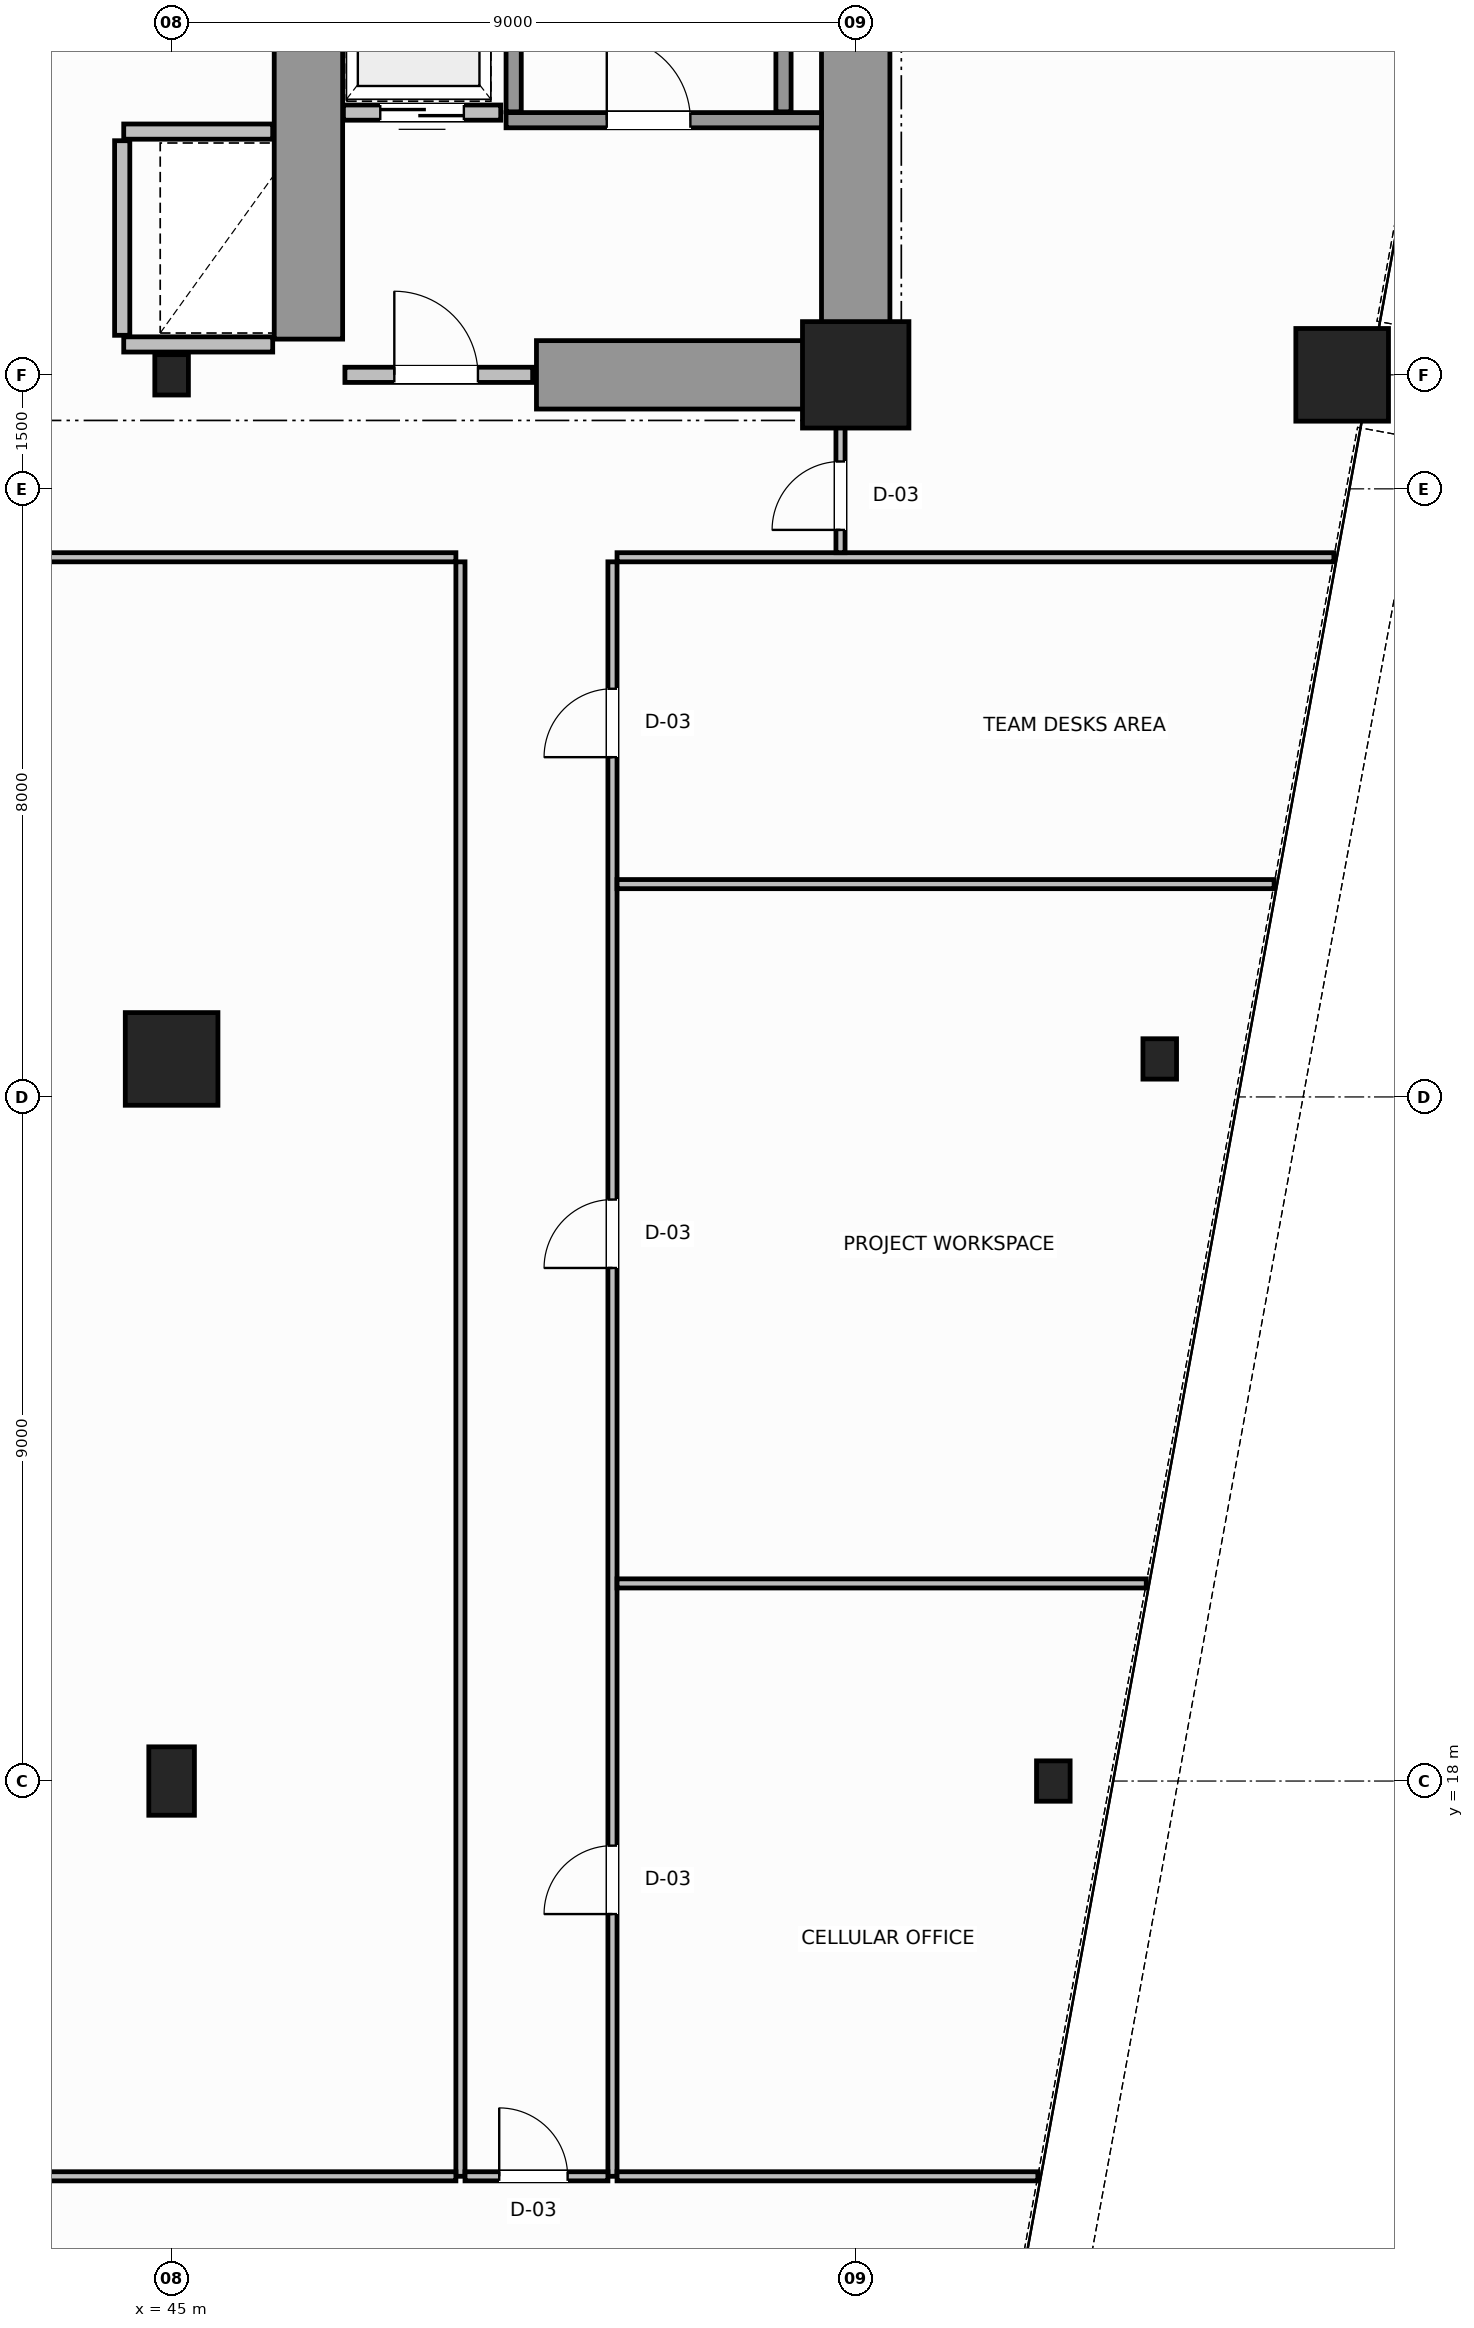
"""IFC4 building model, lengths in metres.
Left out: names, types, materials, properties, quantities, classifications, styles, units other than length and angle.
Written with IfcOpenShell. Run it as: python <this file> out.ifc"""

import sys

from ifc_helpers import new_model, si_unit, direction, frame, frame_2d, origin, origin_2d, place, context, subcontext, project, spatial, rectangle, hollow_rectangle, hollow_circle, i_section, extrude, source, transform, mapped, element, fill, save


model = new_model("IFC4")
c1 = context("Model", 3, precision=1e-05, world=origin(), true_north=direction((0.0, 1.0)))
c2 = subcontext(c1, "Body", "Model", "MODEL_VIEW")
j1 = project(units=[si_unit("LENGTHUNIT", "METRE"), si_unit("PLANEANGLEUNIT", "RADIAN")], contexts=[c1])
p1 = place(None, origin())
s1 = spatial("IfcSite", under=j1, at=p1, CompositionType="ELEMENT")
p2 = place(p1, origin())
s2 = spatial("IfcBuilding", under=s1, at=p2, CompositionType="ELEMENT")
p3 = place(p2, frame((0.0, 0.0, 79.6)))
s3 = spatial("IfcBuildingStorey", under=s2, at=p3, CompositionType="ELEMENT", Elevation=79.6)
m1 = source(origin(), c2, "Body", "SweptSolid", [
    extrude(i_section(OverallWidth=0.442, OverallDepth=0.531, WebThickness=0.065, FlangeThickness=0.076, FilletRadius=0.015, at=origin_2d()), origin(), (0.0, 0.0, 1.0), 3.8),
])
p4 = place(p3, frame((45.0, 36.5, 0.0), z_axis=(0.0, 0.0, 1.0), x_axis=(1.0, 0.0, 0.0)))
e1 = element("IfcColumn", 1, at=p4, inside=s3, PredefinedType="COLUMN", context=c2, shape_type="MappedRepresentation", body=[
    mapped(m1, transform((0.0, 0.0, 0.0), scale=1.0)),
])
m2 = source(origin(), c2, "Body", "SweptSolid", [
    extrude(rectangle(XDim=1.4, YDim=1.4, at=origin_2d()), origin(), (0.0, 0.0, 1.0), 3.8),
])
p5 = place(p3, frame((54.0, 36.5, 0.0), z_axis=(0.0, 0.0, 1.0), x_axis=(1.0, 0.0, 0.0)))
e2 = element("IfcColumn", 2, at=p5, inside=s3, PredefinedType="COLUMN", context=c2, shape_type="MappedRepresentation", body=[
    mapped(m2, transform((0.0, 0.0, 0.0), scale=1.0)),
])
m3 = source(origin(), c2, "Body", "SweptSolid", [
    extrude(hollow_circle(Radius=0.61, WallThickness=0.05, at=origin_2d()), origin(), (0.0, 0.0, 1.0), 3.8),
])
p6 = place(p3, frame((60.4, 36.5, 0.0), z_axis=(0.0, 0.0, 1.0), x_axis=(1.0, 0.0, 0.0)))
e3 = element("IfcColumn", 3, at=p6, inside=s3, PredefinedType="COLUMN", context=c2, shape_type="MappedRepresentation", body=[
    mapped(m3, transform((0.0, 0.0, 0.0), scale=1.0)),
])
m4 = source(origin(), c2, "Body", "SweptSolid", [
    extrude(i_section(OverallWidth=0.442, OverallDepth=0.531, WebThickness=0.065, FlangeThickness=0.076, FilletRadius=0.015, at=origin_2d()), origin(), (0.0, 0.0, 1.0), 3.8),
])
for number, where, z_axis, x_axis in (
    (4, (58.0, 27.5, 0.0), (0.0, 0.0, 1.0), (1.0, 0.0, 0.0)),
    (5, (56.6, 18.0, 0.0), (0.0, 0.0, 1.0), (1.0, 0.0, 0.0)),
):
    element("IfcColumn", number, at=place(p3, frame(where, z_axis=z_axis, x_axis=x_axis)), inside=s3, PredefinedType="COLUMN", context=c2, shape_type="MappedRepresentation", body=[
        mapped(m4, transform((0.0, 0.0, 0.0), scale=1.0)),
    ])
p7 = place(p3, frame((45.0, 27.5, 0.0), z_axis=(0.0, 0.0, 1.0), x_axis=(1.0, 0.0, 0.0)))
e6 = element("IfcColumn", 6, at=p7, inside=s3, PredefinedType="COLUMN", context=c2, shape_type="MappedRepresentation", body=[
    mapped(m3, transform((0.0, 0.0, 0.0), scale=1.0)),
])
m5 = source(origin(), c2, "Body", "SweptSolid", [
    extrude(hollow_rectangle(XDim=0.6, YDim=0.9, WallThickness=0.04, InnerFilletRadius=0.04, OuterFilletRadius=0.08, at=origin_2d()), origin(), (0.0, 0.0, 1.0), 3.8),
])
p8 = place(p3, frame((45.0, 18.0, 0.0), z_axis=(0.0, 0.0, 1.0), x_axis=(1.0, 0.0, 0.0)))
e7 = element("IfcColumn", 7, at=p8, inside=s3, PredefinedType="COLUMN", context=c2, shape_type="MappedRepresentation", body=[
    mapped(m5, transform((0.0, 0.0, 0.0), scale=1.0)),
])
p9 = place(p3, frame((54.0, 36.5, 0.0), z_axis=(0.0, 0.0, 1.0), x_axis=(0.0, 1.0, 0.0)))
e8 = element("IfcWall", 8, at=p9, inside=s3, PredefinedType="SHEAR", context=c2, shape_type="SweptSolid", body=[
    extrude(rectangle(XDim=14.5, YDim=0.9, at=frame_2d((7.25, 0.0))), origin(), (0.0, 0.0, 1.0), 3.8),
])
p10 = place(p3, frame((49.8, 36.5, 0.0), z_axis=(0.0, 0.0, 1.0), x_axis=(1.0, 0.0, 0.0)))
e9 = element("IfcWall", 9, at=p10, inside=s3, PredefinedType="SHEAR", context=c2, shape_type="SweptSolid", body=[
    extrude(rectangle(XDim=3.73, YDim=0.9, at=frame_2d((1.865, 0.0))), origin(), (0.0, 0.0, 1.0), 2.34),
])
p11 = place(p3, frame((46.8, 36.97, 0.0), z_axis=(0.0, 0.0, 1.0), x_axis=(0.0, 1.0, 0.0)))
e10 = element("IfcWall", 10, at=p11, inside=s3, PredefinedType="SHEAR", context=c2, shape_type="SweptSolid", body=[
    extrude(rectangle(XDim=9.23, YDim=0.9, at=frame_2d((4.615, 0.0))), origin(), (0.0, 0.0, 1.0), 3.8),
])
p12 = place(p3, frame((49.4, 39.85, 0.0), z_axis=(0.0, 0.0, 1.0), x_axis=(1.0, 0.0, 0.0)))
e11 = element("IfcWall", 11, at=p12, inside=s3, PredefinedType="SOLIDWALL", context=c2, shape_type="SweptSolid", body=[
    extrude(rectangle(XDim=4.15, YDim=0.2, at=frame_2d((2.075, 0.0))), origin(), (0.0, 0.0, 1.0), 3.8),
])
p13 = place(p12, frame((1.325, 0.0, 0.0)))
e12 = element("IfcOpeningElement", 12, at=p13, cuts=e11, PredefinedType="OPENING", context=c2, shape_type="SweptSolid", body=[
    extrude(rectangle(XDim=1.1, YDim=2.15, at=frame_2d((0.55, 1.075))), frame((0.0, 0.11, 0.0), z_axis=(0.0, -1.0, 0.0), x_axis=(1.0, 0.0, 0.0)), (0.0, 0.0, 1.0), 0.22),
])
for number, where, z_axis, x_axis in (
    (13, (49.5, 39.96, 0.0), (0.0, 0.0, 1.0), (0.0, 1.0, 0.0)),
    (14, (53.05, 39.96, 0.0), (0.0, 0.0, 1.0), (0.0, 1.0, 0.0)),
):
    element("IfcWall", number, at=place(p3, frame(where, z_axis=z_axis, x_axis=x_axis)), inside=s3, PredefinedType="SOLIDWALL", context=c2, shape_type="SweptSolid", body=[
        extrude(rectangle(XDim=9.93, YDim=0.2, at=frame_2d((4.965, 0.0))), origin(), (0.0, 0.0, 1.0), 3.8),
    ])
p14 = place(p3, frame((47.28, 36.5, 0.0), z_axis=(0.0, 0.0, 1.0), x_axis=(1.0, 0.0, 0.0)))
e15 = element("IfcWall", 15, at=p14, inside=s3, PredefinedType="SOLIDWALL", context=c2, shape_type="SweptSolid", body=[
    extrude(rectangle(XDim=2.47, YDim=0.2, at=frame_2d((1.235, 0.0))), origin(), (0.0, 0.0, 1.0), 2.33),
])
p15 = place(p14, frame((0.65, 0.0, 0.0)))
e16 = element("IfcOpeningElement", 16, at=p15, cuts=e15, PredefinedType="OPENING", context=c2, shape_type="SweptSolid", body=[
    extrude(rectangle(XDim=1.1, YDim=2.15, at=frame_2d((0.55, 1.075))), frame((0.0, 0.11, 0.0), z_axis=(0.0, -1.0, 0.0), x_axis=(1.0, 0.0, 0.0)), (0.0, 0.0, 1.0), 0.22),
])
p16 = place(p3, frame((44.37, 39.7, 0.0), z_axis=(0.0, 0.0, 1.0), x_axis=(1.0, 0.0, 0.0)))
e17 = element("IfcWall", 17, at=p16, inside=s3, PredefinedType="SOLIDWALL", context=c2, shape_type="SweptSolid", body=[
    extrude(rectangle(XDim=1.96, YDim=0.2, at=frame_2d((0.98, 0.0))), origin(), (0.0, 0.0, 1.0), 3.54),
])
p17 = place(p3, frame((44.37, 36.9, 0.0), z_axis=(0.0, 0.0, 1.0), x_axis=(1.0, 0.0, 0.0)))
e18 = element("IfcWall", 18, at=p17, inside=s3, PredefinedType="SOLIDWALL", context=c2, shape_type="SweptSolid", body=[
    extrude(rectangle(XDim=1.96, YDim=0.2, at=frame_2d((0.98, 0.0))), origin(), (0.0, 0.0, 1.0), 2.33),
])
p18 = place(p3, frame((44.35, 37.02, 0.0), z_axis=(0.0, 0.0, 1.0), x_axis=(0.0, 1.0, 0.0)))
e19 = element("IfcWall", 19, at=p18, inside=s3, PredefinedType="SOLIDWALL", context=c2, shape_type="SweptSolid", body=[
    extrude(rectangle(XDim=2.56, YDim=0.2, at=frame_2d((1.28, 0.0))), origin(), (0.0, 0.0, 1.0), 3.54),
])
p19 = place(p3, frame((47.26, 39.95, 0.0), z_axis=(0.0, 0.0, 1.0), x_axis=(1.0, 0.0, 0.0)))
e20 = element("IfcWall", 20, at=p19, inside=s3, PredefinedType="SOLIDWALL", context=c2, shape_type="SweptSolid", body=[
    extrude(rectangle(XDim=2.07, YDim=0.2, at=frame_2d((1.035, 0.0))), origin(), (0.0, 0.0, 1.0), 3.54),
])
p20 = place(p19, frame((0.485, 0.0, 0.0)))
e21 = element("IfcOpeningElement", 21, at=p20, cuts=e20, PredefinedType="OPENING", context=c2, shape_type="SweptSolid", body=[
    extrude(rectangle(XDim=1.1, YDim=2.15, at=frame_2d((0.55, 1.075))), frame((0.0, 0.11, 0.0), z_axis=(0.0, -1.0, 0.0), x_axis=(1.0, 0.0, 0.0)), (0.0, 0.0, 1.0), 0.22),
])
p21 = place(p3, frame((19.26, 34.1, 0.0), z_axis=(0.0, 0.0, 1.0), x_axis=(1.0, 0.0, 0.0)))
e22 = element("IfcWall", 22, at=p21, inside=s3, PredefinedType="PARTITIONING", context=c2, shape_type="SweptSolid", body=[
    extrude(rectangle(XDim=29.48, YDim=0.12, at=frame_2d((14.74, 0.0))), origin(), (0.0, 0.0, 1.0), 3.54),
])
p22 = place(p21, frame((1.49, 0.0, 0.0)))
e23 = element("IfcOpeningElement", 23, at=p22, cuts=e22, PredefinedType="OPENING", context=c2, shape_type="SweptSolid", body=[
    extrude(rectangle(XDim=0.9, YDim=2.15, at=frame_2d((0.45, 1.075))), frame((0.0, 0.07, 0.0), z_axis=(0.0, -1.0, 0.0), x_axis=(1.0, 0.0, 0.0)), (0.0, 0.0, 1.0), 0.14),
])
p23 = place(p21, frame((9.79, 0.0, 0.0)))
e24 = element("IfcOpeningElement", 24, at=p23, cuts=e22, PredefinedType="OPENING", context=c2, shape_type="SweptSolid", body=[
    extrude(rectangle(XDim=0.9, YDim=2.15, at=frame_2d((0.45, 1.075))), frame((0.0, 0.07, 0.0), z_axis=(0.0, -1.0, 0.0), x_axis=(1.0, 0.0, 0.0)), (0.0, 0.0, 1.0), 0.14),
])
p24 = place(p21, frame((22.59, 0.0, 0.0)))
e25 = element("IfcOpeningElement", 25, at=p24, cuts=e22, PredefinedType="OPENING", context=c2, shape_type="SweptSolid", body=[
    extrude(rectangle(XDim=0.9, YDim=2.15, at=frame_2d((0.45, 1.075))), frame((0.0, 0.07, 0.0), z_axis=(0.0, -1.0, 0.0), x_axis=(1.0, 0.0, 0.0)), (0.0, 0.0, 1.0), 0.14),
])
p25 = place(p3, frame((50.86, 34.1, 0.0), z_axis=(0.0, 0.0, 1.0), x_axis=(1.0, 0.0, 0.0)))
e26 = element("IfcWall", 26, at=p25, inside=s3, PredefinedType="PARTITIONING", context=c2, shape_type="SweptSolid", body=[
    extrude(rectangle(XDim=9.431, YDim=0.12, at=frame_2d((4.715, 0.0))), origin(), (0.0, 0.0, 1.0), 3.54),
])
p26 = place(p3, frame((53.8, 34.16, 0.0), z_axis=(0.0, 0.0, 1.0), x_axis=(0.0, 1.0, 0.0)))
e27 = element("IfcWall", 27, at=p26, inside=s3, PredefinedType="PARTITIONING", context=c2, shape_type="SweptSolid", body=[
    extrude(rectangle(XDim=2.28, YDim=0.12, at=frame_2d((1.14, 0.0))), origin(), (0.0, 0.0, 1.0), 3.54),
])
p27 = place(p26, frame((0.3, 0.0, 0.0)))
e28 = element("IfcOpeningElement", 28, at=p27, cuts=e27, PredefinedType="OPENING", context=c2, shape_type="SweptSolid", body=[
    extrude(rectangle(XDim=0.9, YDim=2.15, at=frame_2d((0.45, 1.075))), frame((0.0, 0.07, 0.0), z_axis=(0.0, -1.0, 0.0), x_axis=(1.0, 0.0, 0.0)), (0.0, 0.0, 1.0), 0.14),
])
p28 = place(p3, frame((48.8, 12.8, 0.0), z_axis=(0.0, 0.0, 1.0), x_axis=(0.0, 1.0, 0.0)))
e29 = element("IfcWall", 29, at=p28, inside=s3, PredefinedType="PARTITIONING", context=c2, shape_type="SweptSolid", body=[
    extrude(rectangle(XDim=21.24, YDim=0.12, at=frame_2d((10.62, 0.0))), origin(), (0.0, 0.0, 1.0), 3.54),
])
p29 = place(p3, frame((50.8, 12.8, 0.0), z_axis=(0.0, 0.0, 1.0), x_axis=(0.0, 1.0, 0.0)))
e30 = element("IfcWall", 30, at=p29, inside=s3, PredefinedType="PARTITIONING", context=c2, shape_type="SweptSolid", body=[
    extrude(rectangle(XDim=21.24, YDim=0.12, at=frame_2d((10.62, 0.0))), origin(), (0.0, 0.0, 1.0), 3.54),
])
p30 = place(p29, frame((3.45, 0.0, 0.0)))
e31 = element("IfcOpeningElement", 31, at=p30, cuts=e30, PredefinedType="OPENING", context=c2, shape_type="SweptSolid", body=[
    extrude(rectangle(XDim=0.9, YDim=2.15, at=frame_2d((0.45, 1.075))), frame((0.0, 0.07, 0.0), z_axis=(0.0, -1.0, 0.0), x_axis=(1.0, 0.0, 0.0)), (0.0, 0.0, 1.0), 0.14),
])
p31 = place(p29, frame((11.95, 0.0, 0.0)))
e32 = element("IfcOpeningElement", 32, at=p31, cuts=e30, PredefinedType="OPENING", context=c2, shape_type="SweptSolid", body=[
    extrude(rectangle(XDim=0.9, YDim=2.15, at=frame_2d((0.45, 1.075))), frame((0.0, 0.07, 0.0), z_axis=(0.0, -1.0, 0.0), x_axis=(1.0, 0.0, 0.0)), (0.0, 0.0, 1.0), 0.14),
])
p32 = place(p29, frame((18.67, 0.0, 0.0)))
e33 = element("IfcOpeningElement", 33, at=p32, cuts=e30, PredefinedType="OPENING", context=c2, shape_type="SweptSolid", body=[
    extrude(rectangle(XDim=0.9, YDim=2.15, at=frame_2d((0.45, 1.075))), frame((0.0, 0.07, 0.0), z_axis=(0.0, -1.0, 0.0), x_axis=(1.0, 0.0, 0.0)), (0.0, 0.0, 1.0), 0.14),
])
p33 = place(p3, frame((48.86, 12.8, 0.0), z_axis=(0.0, 0.0, 1.0), x_axis=(1.0, 0.0, 0.0)))
e34 = element("IfcWall", 34, at=p33, inside=s3, PredefinedType="PARTITIONING", context=c2, shape_type="SweptSolid", body=[
    extrude(rectangle(XDim=1.88, YDim=0.12, at=frame_2d((0.94, 0.0))), origin(), (0.0, 0.0, 1.0), 3.54),
])
p34 = place(p33, frame((0.45, 0.0, 0.0)))
e35 = element("IfcOpeningElement", 35, at=p34, cuts=e34, PredefinedType="OPENING", context=c2, shape_type="SweptSolid", body=[
    extrude(rectangle(XDim=0.9, YDim=2.15, at=frame_2d((0.45, 1.075))), frame((0.0, 0.07, 0.0), z_axis=(0.0, -1.0, 0.0), x_axis=(1.0, 0.0, 0.0)), (0.0, 0.0, 1.0), 0.14),
])
p35 = place(p3, frame((50.86, 12.8, 0.0), z_axis=(0.0, 0.0, 1.0), x_axis=(1.0, 0.0, 0.0)))
e36 = element("IfcWall", 36, at=p35, inside=s3, PredefinedType="PARTITIONING", context=c2, shape_type="SweptSolid", body=[
    extrude(rectangle(XDim=5.536, YDim=0.12, at=frame_2d((2.768, 0.0))), origin(), (0.0, 0.0, 1.0), 3.54),
])
p36 = place(p3, frame((50.86, 20.6, 0.0), z_axis=(0.0, 0.0, 1.0), x_axis=(1.0, 0.0, 0.0)))
e37 = element("IfcWall", 37, at=p36, inside=s3, PredefinedType="PARTITIONING", context=c2, shape_type="SweptSolid", body=[
    extrude(rectangle(XDim=6.962, YDim=0.12, at=frame_2d((3.481, 0.0))), origin(), (0.0, 0.0, 1.0), 3.54),
])
p37 = place(p3, frame((50.86, 29.8, 0.0), z_axis=(0.0, 0.0, 1.0), x_axis=(1.0, 0.0, 0.0)))
e38 = element("IfcWall", 38, at=p37, inside=s3, PredefinedType="PARTITIONING", context=c2, shape_type="SweptSolid", body=[
    extrude(rectangle(XDim=8.645, YDim=0.12, at=frame_2d((4.322, 0.0))), origin(), (0.0, 0.0, 1.0), 3.54),
])
p38 = place(p3, frame((19.26, 12.8, 0.0), z_axis=(0.0, 0.0, 1.0), x_axis=(1.0, 0.0, 0.0)))
e39 = element("IfcWall", 39, at=p38, inside=s3, PredefinedType="PARTITIONING", context=c2, shape_type="SweptSolid", body=[
    extrude(rectangle(XDim=29.48, YDim=0.12, at=frame_2d((14.74, 0.0))), origin(), (0.0, 0.0, 1.0), 3.54),
])
m6 = source(origin(), c2, "Body", "SweptSolid", [
    extrude(rectangle(XDim=1.1, YDim=2.15, at=frame_2d((0.55, 1.075))), frame((0.0, 0.025, 0.0), z_axis=(0.0, -1.0, 0.0), x_axis=(1.0, 0.0, 0.0)), (0.0, 0.0, 1.0), 0.05),
])
p39 = place(p13, origin())
e40 = element("IfcDoor", 40, at=p39, inside=s3, OperationType="SINGLE_SWING_RIGHT", PredefinedType="DOOR", context=c2, shape_type="MappedRepresentation", body=[
    mapped(m6, transform((0.0, 0.0, 0.0), scale=1.0)),
])
fill(e12, e40)
p40 = place(p15, origin())
e41 = element("IfcDoor", 41, at=p40, inside=s3, OperationType="SINGLE_SWING_LEFT", PredefinedType="DOOR", context=c2, shape_type="MappedRepresentation", body=[
    mapped(m6, transform((0.0, 0.0, 0.0), scale=1.0)),
])
fill(e16, e41)
p41 = place(p20, origin())
e42 = element("IfcDoor", 42, at=p41, inside=s3, OperationType="DOUBLE_DOOR_SLIDING", PredefinedType="DOOR", context=c2, shape_type="MappedRepresentation", body=[
    mapped(m6, transform((0.0, 0.0, 0.0), scale=1.0)),
])
fill(e21, e42)
m7 = source(origin(), c2, "Body", "SweptSolid", [
    extrude(rectangle(XDim=0.9, YDim=2.15, at=frame_2d((0.45, 1.075))), frame((0.0, 0.025, 0.0), z_axis=(0.0, -1.0, 0.0), x_axis=(1.0, 0.0, 0.0)), (0.0, 0.0, 1.0), 0.05),
])
p42 = place(p27, origin())
e43 = element("IfcDoor", 43, at=p42, inside=s3, OperationType="SINGLE_SWING_RIGHT", PredefinedType="DOOR", context=c2, shape_type="MappedRepresentation", body=[
    mapped(m7, transform((0.0, 0.0, 0.0), scale=1.0)),
])
fill(e28, e43)
p43 = place(p30, origin())
e44 = element("IfcDoor", 44, at=p43, inside=s3, OperationType="SINGLE_SWING_RIGHT", PredefinedType="DOOR", context=c2, shape_type="MappedRepresentation", body=[
    mapped(m7, transform((0.0, 0.0, 0.0), scale=1.0)),
])
fill(e31, e44)
p44 = place(p31, origin())
e45 = element("IfcDoor", 45, at=p44, inside=s3, OperationType="SINGLE_SWING_LEFT", PredefinedType="DOOR", context=c2, shape_type="MappedRepresentation", body=[
    mapped(m7, transform((0.0, 0.0, 0.0), scale=1.0)),
])
fill(e32, e45)
p45 = place(p32, origin())
e46 = element("IfcDoor", 46, at=p45, inside=s3, OperationType="SINGLE_SWING_RIGHT", PredefinedType="DOOR", context=c2, shape_type="MappedRepresentation", body=[
    mapped(m7, transform((0.0, 0.0, 0.0), scale=1.0)),
])
fill(e33, e46)
p46 = place(p34, origin())
e47 = element("IfcDoor", 47, at=p46, inside=s3, OperationType="SINGLE_SWING_RIGHT", PredefinedType="DOOR", context=c2, shape_type="MappedRepresentation", body=[
    mapped(m7, transform((0.0, 0.0, 0.0), scale=1.0)),
])
fill(e35, e47)
save(model, sys.argv[1])
